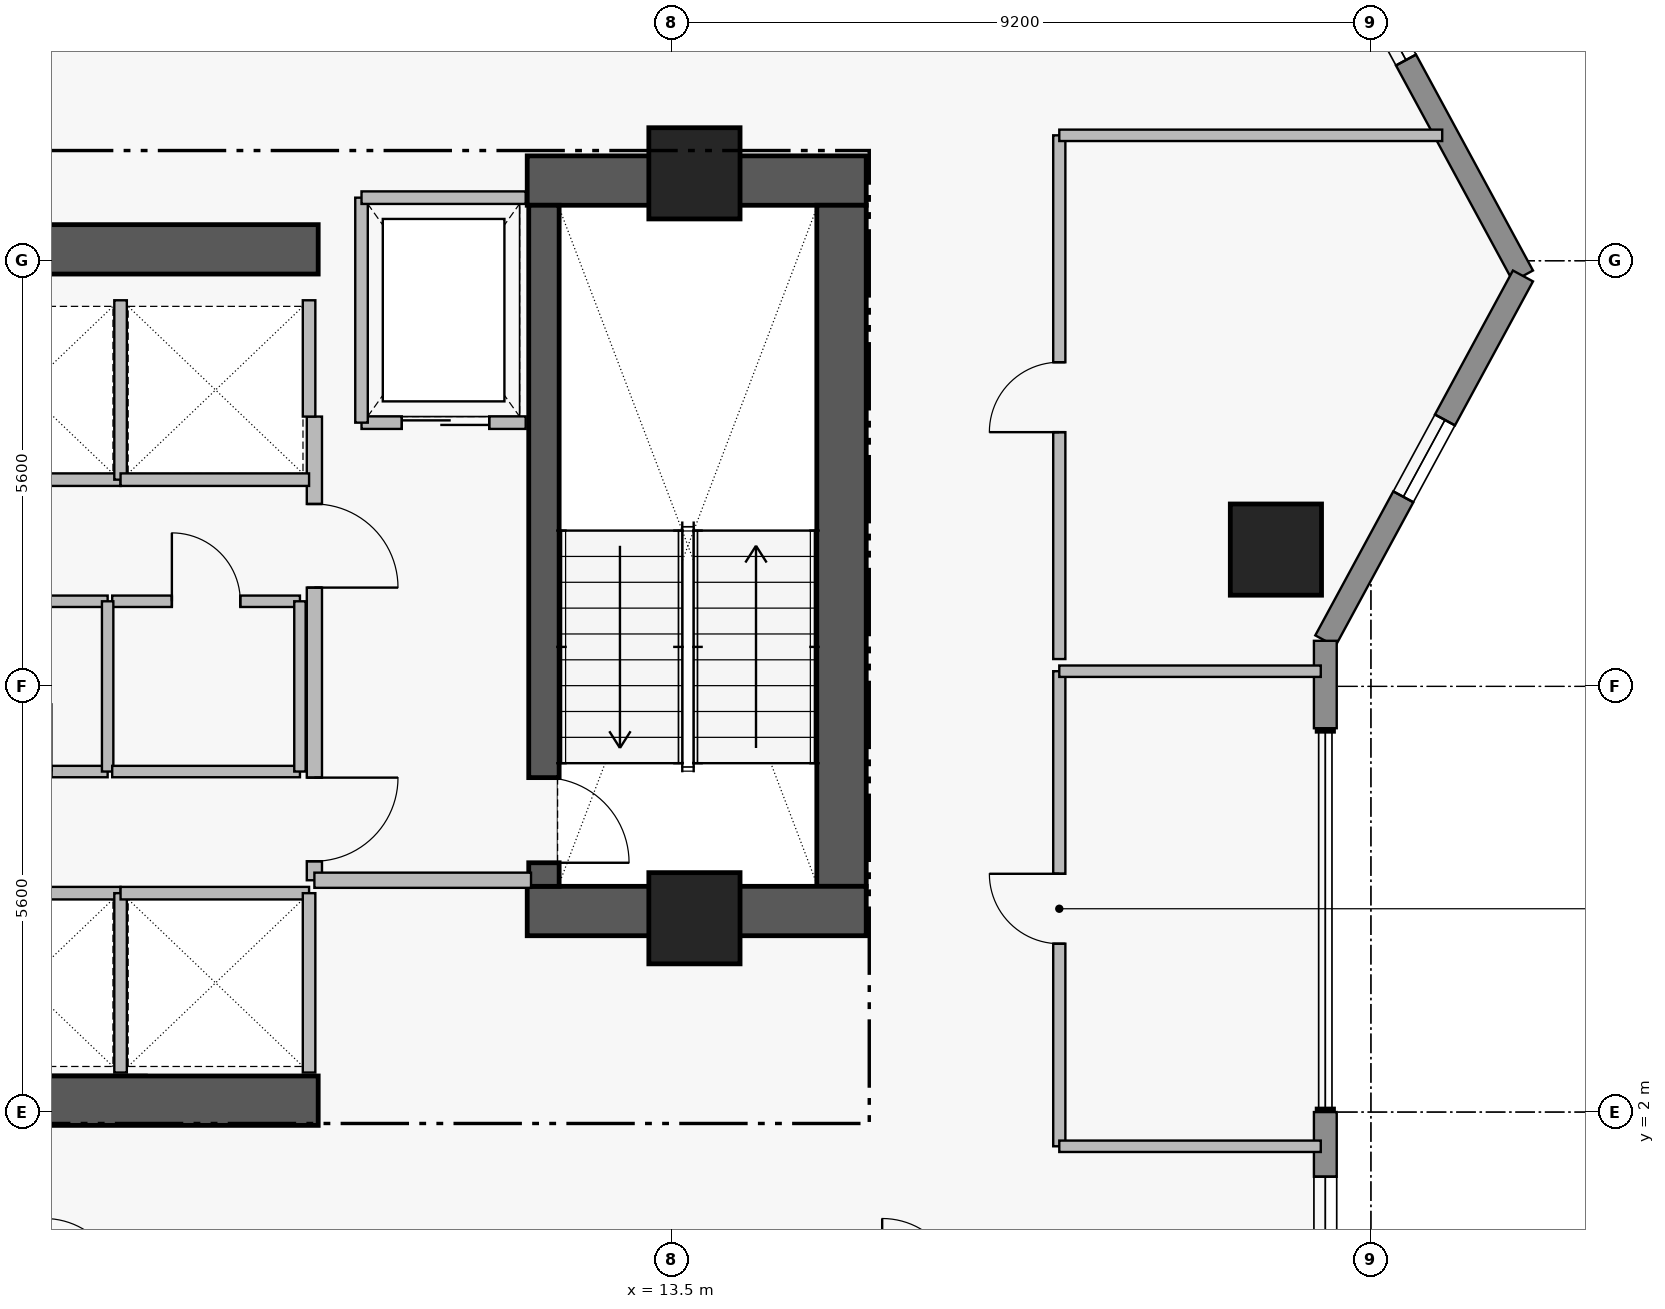
"""IFC4 building model, lengths in metres.
Left out: names, types, materials, properties, quantities, classifications, styles, units other than length and angle.
Written with IfcOpenShell. Run it as: python <this file> out.ifc"""

import sys

from ifc_helpers import new_model, si_unit, direction, frame, frame_2d, origin, origin_2d, place, context, subcontext, project, spatial, rectangle, extrude, element, fill, save


model = new_model("IFC4")
c1 = context("Model", 3, precision=1e-05, world=origin(), true_north=direction((0.0, 1.0)))
c2 = subcontext(c1, "Body", "Model", "MODEL_VIEW")
j1 = project(units=[si_unit("LENGTHUNIT", "METRE"), si_unit("PLANEANGLEUNIT", "RADIAN")], contexts=[c1])
p1 = place(None, origin())
s1 = spatial("IfcSite", under=j1, at=p1, CompositionType="ELEMENT")
p2 = place(p1, origin())
s2 = spatial("IfcBuilding", under=s1, at=p2, CompositionType="ELEMENT")
p3 = place(p2, frame((0.0, 0.0, 222.4)))
s3 = spatial("IfcBuildingStorey", under=s2, at=p3, CompositionType="ELEMENT", Elevation=222.4)
p4 = place(p3, frame((11.6, 14.255, 0.0), z_axis=(0.0, 0.0, 1.0), x_axis=(1.0, 0.0, 0.0)))
e1 = element("IfcWall", 1, at=p4, inside=s3, PredefinedType="SHEAR", context=c2, shape_type="SweptSolid", body=[
    extrude(rectangle(XDim=4.46, YDim=0.65, at=frame_2d((2.23, 0.0))), origin(), (0.0, 0.0, 1.0), 3.56),
])
p5 = place(p3, frame((15.735, 4.97, 0.0), z_axis=(0.0, 0.0, 1.0), x_axis=(0.0, 1.0, 0.0)))
e2 = element("IfcWall", 2, at=p5, inside=s3, PredefinedType="SHEAR", context=c2, shape_type="SweptSolid", body=[
    extrude(rectangle(XDim=8.96, YDim=0.65, at=frame_2d((4.48, 0.0))), origin(), (0.0, 0.0, 1.0), 3.56),
])
p6 = place(p3, frame((11.6, 4.645, 0.0), z_axis=(0.0, 0.0, 1.0), x_axis=(1.0, 0.0, 0.0)))
e3 = element("IfcWall", 3, at=p6, inside=s3, PredefinedType="SHEAR", context=c2, shape_type="SweptSolid", body=[
    extrude(rectangle(XDim=4.46, YDim=0.65, at=frame_2d((2.23, 0.0))), origin(), (0.0, 0.0, 1.0), 3.56),
])
for number, where, z_axis, x_axis in (
    (4, (1.25, 2.15, 0.0), (0.0, 0.0, 1.0), (1.0, 0.0, 0.0)),
    (5, (1.25, 13.35, 0.0), (0.0, 0.0, 1.0), (1.0, 0.0, 0.0)),
):
    element("IfcWall", number, at=place(p3, frame(where, z_axis=z_axis, x_axis=x_axis)), inside=s3, PredefinedType="SHEAR", context=c2, shape_type="SweptSolid", body=[
        extrude(rectangle(XDim=7.6, YDim=0.65, at=frame_2d((3.8, 0.0))), origin(), (0.0, 0.0, 1.0), 3.53),
    ])
p7 = place(p3, frame((11.82, 13.93, 0.0), z_axis=(0.0, 0.0, 1.0), x_axis=(0.0, -1.0, 0.0)))
e6 = element("IfcWall", 6, at=p7, inside=s3, PredefinedType="SHEAR", context=c2, shape_type="SweptSolid", body=[
    extrude(rectangle(XDim=8.96, YDim=0.4, at=frame_2d((4.48, 0.0))), origin(), (0.0, 0.0, 1.0), 3.56),
])
p8 = place(p7, frame((7.53, 0.0, 0.0)))
e7 = element("IfcOpeningElement", 7, at=p8, cuts=e6, PredefinedType="OPENING", context=c2, shape_type="SweptSolid", body=[
    extrude(rectangle(XDim=1.12, YDim=2.22, at=frame_2d((0.56, 1.11))), frame((0.0, 0.21, 0.0), z_axis=(0.0, -1.0, 0.0), x_axis=(1.0, 0.0, 0.0)), (0.0, 0.0, 1.0), 0.42),
])
for number, where, z_axis, x_axis in (
    (8, (13.8, 14.35, 0.0), (0.0, 0.0, 1.0), (1.0, 0.0, 0.0)),
    (9, (13.8, 4.55, 0.0), (0.0, 0.0, 1.0), (1.0, 0.0, 0.0)),
    (10, (21.45, 9.4, 0.0), (0.0, 0.0, 1.0), (1.0, 0.0, 0.0)),
):
    element("IfcColumn", number, at=place(p3, frame(where, z_axis=z_axis, x_axis=x_axis)), inside=s3, PredefinedType="COLUMN", context=c2, shape_type="SweptSolid", body=[
        extrude(rectangle(XDim=1.2, YDim=1.2, at=origin_2d()), origin(), (0.0, 0.0, 1.0), 3.75),
    ])
p9 = place(p3, frame((22.1, 17.8, 0.0), z_axis=(0.0, 0.0, 1.0), x_axis=(0.476258655584, -0.879305233114, 0.0)))
e11 = element("IfcWall", 11, at=p9, inside=s3, PredefinedType="STANDARD", context=c2, shape_type="SweptSolid", body=[
    extrude(rectangle(XDim=5.459, YDim=0.3, at=frame_2d((2.729, 0.0))), origin(), (0.0, 0.0, 1.0), 3.53),
])
p10 = place(p9, frame((1.078, 0.0, 1.25)))
e12 = element("IfcOpeningElement", 12, at=p10, cuts=e11, PredefinedType="OPENING", context=c2, shape_type="SweptSolid", body=[
    extrude(rectangle(XDim=1.15, YDim=1.55, at=frame_2d((0.575, 0.775))), frame((0.0, 0.16, 0.0), z_axis=(0.0, -1.0, 0.0), x_axis=(1.0, 0.0, 0.0)), (0.0, 0.0, 1.0), 0.32),
])
p11 = place(p3, frame((24.7, 13.0, 0.0), z_axis=(0.0, 0.0, 1.0), x_axis=(-0.476258655584, -0.879305233114, 0.0)))
e13 = element("IfcWall", 13, at=p11, inside=s3, PredefinedType="STANDARD", context=c2, shape_type="SweptSolid", body=[
    extrude(rectangle(XDim=5.459, YDim=0.3, at=frame_2d((2.729, 0.0))), origin(), (0.0, 0.0, 1.0), 3.53),
])
p12 = place(p11, frame((2.155, 0.0, 1.25)))
e14 = element("IfcOpeningElement", 14, at=p12, cuts=e13, PredefinedType="OPENING", context=c2, shape_type="SweptSolid", body=[
    extrude(rectangle(XDim=1.15, YDim=1.55, at=frame_2d((0.575, 0.775))), frame((0.0, 0.16, 0.0), z_axis=(0.0, -1.0, 0.0), x_axis=(1.0, 0.0, 0.0)), (0.0, 0.0, 1.0), 0.32),
])
p13 = place(p3, frame((22.1, 8.2, 0.0), z_axis=(0.0, 0.0, 1.0), x_axis=(0.0, -1.0, 0.0)))
e15 = element("IfcWall", 15, at=p13, inside=s3, PredefinedType="STANDARD", context=c2, shape_type="SweptSolid", body=[
    extrude(rectangle(XDim=1.15, YDim=0.3, at=frame_2d((0.575, 0.0))), origin(), (0.0, 0.0, 1.0), 3.53),
])
p14 = place(p3, frame((22.1, 2.0, 0.0), z_axis=(0.0, 0.0, 1.0), x_axis=(0.0, -1.0, 0.0)))
e16 = element("IfcWall", 16, at=p14, inside=s3, PredefinedType="STANDARD", context=c2, shape_type="SweptSolid", body=[
    extrude(rectangle(XDim=2.85, YDim=0.3, at=frame_2d((1.425, 0.0))), origin(), (0.0, 0.0, 1.0), 3.53),
])
p15 = place(p14, frame((0.85, 0.0, 0.95)))
e17 = element("IfcOpeningElement", 17, at=p15, cuts=e16, PredefinedType="OPENING", context=c2, shape_type="SweptSolid", body=[
    extrude(rectangle(XDim=1.15, YDim=1.55, at=frame_2d((0.575, 0.775))), frame((0.0, 0.16, 0.0), z_axis=(0.0, -1.0, 0.0), x_axis=(1.0, 0.0, 0.0)), (0.0, 0.0, 1.0), 0.32),
])
p16 = place(p3, frame((8.8, 11.15, 0.0), z_axis=(0.0, 0.0, 1.0), x_axis=(0.0, -1.0, 0.0)))
e18 = element("IfcWall", 18, at=p16, inside=s3, PredefinedType="PARTITIONING", context=c2, shape_type="SweptSolid", body=[
    extrude(rectangle(XDim=6.1, YDim=0.2, at=frame_2d((3.05, 0.0))), origin(), (0.0, 0.0, 1.0), 3.53),
])
p17 = place(p16, frame((1.15, 0.0, 0.0)))
e19 = element("IfcOpeningElement", 19, at=p17, cuts=e18, PredefinedType="OPENING", context=c2, shape_type="SweptSolid", body=[
    extrude(rectangle(XDim=1.1, YDim=2.2, at=frame_2d((0.55, 1.1))), frame((0.0, 0.11, 0.0), z_axis=(0.0, -1.0, 0.0), x_axis=(1.0, 0.0, 0.0)), (0.0, 0.0, 1.0), 0.22),
])
p18 = place(p16, frame((4.75, 0.0, 0.0)))
e20 = element("IfcOpeningElement", 20, at=p18, cuts=e18, PredefinedType="OPENING", context=c2, shape_type="SweptSolid", body=[
    extrude(rectangle(XDim=1.1, YDim=2.2, at=frame_2d((0.55, 1.1))), frame((0.0, 0.11, 0.0), z_axis=(0.0, -1.0, 0.0), x_axis=(1.0, 0.0, 0.0)), (0.0, 0.0, 1.0), 0.22),
])
p19 = place(p3, frame((9.42, 11.07, 0.0), z_axis=(0.0, 0.0, 1.0), x_axis=(1.0, 0.0, 0.0)))
e21 = element("IfcWall", 21, at=p19, inside=s3, PredefinedType="PARTITIONING", context=c2, shape_type="SweptSolid", body=[
    extrude(rectangle(XDim=2.16, YDim=0.165, at=frame_2d((1.08, 0.0))), origin(), (0.0, 0.0, 1.0), 3.53),
])
p20 = place(p19, frame((0.53, 0.0, 0.0)))
e22 = element("IfcOpeningElement", 22, at=p20, cuts=e21, PredefinedType="OPENING", context=c2, shape_type="SweptSolid", body=[
    extrude(rectangle(XDim=1.15, YDim=2.25, at=frame_2d((0.575, 1.125))), frame((0.0, 0.093, 0.0), z_axis=(0.0, -1.0, 0.0), x_axis=(1.0, 0.0, 0.0)), (0.0, 0.0, 1.0), 0.185),
])
p21 = place(p3, frame((3.7, 6.48, 0.0), z_axis=(0.0, 0.0, 1.0), x_axis=(1.0, 0.0, 0.0)))
e23 = element("IfcWall", 23, at=p21, inside=s3, PredefinedType="PARTITIONING", context=c2, shape_type="SweptSolid", body=[
    extrude(rectangle(XDim=2.38, YDim=0.15, at=frame_2d((1.19, 0.0))), origin(), (0.0, 0.0, 1.0), 3.53),
])
p22 = place(p21, frame((0.74, 0.0, 0.0)))
e24 = element("IfcOpeningElement", 24, at=p22, cuts=e23, PredefinedType="OPENING", context=c2, shape_type="SweptSolid", body=[
    extrude(rectangle(XDim=0.9, YDim=2.15, at=frame_2d((0.45, 1.075))), frame((0.0, 0.085, 0.0), z_axis=(0.0, -1.0, 0.0), x_axis=(1.0, 0.0, 0.0)), (0.0, 0.0, 1.0), 0.17),
])
p23 = place(p3, frame((6.14, 8.72, 0.0), z_axis=(0.0, 0.0, 1.0), x_axis=(1.0, 0.0, 0.0)))
e25 = element("IfcWall", 25, at=p23, inside=s3, PredefinedType="PARTITIONING", context=c2, shape_type="SweptSolid", body=[
    extrude(rectangle(XDim=2.47, YDim=0.15, at=frame_2d((1.235, 0.0))), origin(), (0.0, 0.0, 1.0), 3.53),
])
p24 = place(p23, frame((0.785, 0.0, 0.0)))
e26 = element("IfcOpeningElement", 26, at=p24, cuts=e25, PredefinedType="OPENING", context=c2, shape_type="SweptSolid", body=[
    extrude(rectangle(XDim=0.9, YDim=2.15, at=frame_2d((0.45, 1.075))), frame((0.0, 0.085, 0.0), z_axis=(0.0, -1.0, 0.0), x_axis=(1.0, 0.0, 0.0)), (0.0, 0.0, 1.0), 0.17),
])
p25 = place(p3, frame((18.6, 1.55, 0.0), z_axis=(0.0, 0.0, 1.0), x_axis=(0.0, 1.0, 0.0)))
e27 = element("IfcWall", 27, at=p25, inside=s3, PredefinedType="PARTITIONING", context=c2, shape_type="SweptSolid", body=[
    extrude(rectangle(XDim=6.25, YDim=0.16, at=frame_2d((3.125, 0.0))), origin(), (0.0, 0.0, 1.0), 3.53),
])
p26 = place(p25, frame((2.665, 0.0, 0.0)))
e28 = element("IfcOpeningElement", 28, at=p26, cuts=e27, PredefinedType="OPENING", context=c2, shape_type="SweptSolid", body=[
    extrude(rectangle(XDim=0.92, YDim=2.12, at=frame_2d((0.46, 1.06))), frame((0.0, 0.09, 0.0), z_axis=(0.0, -1.0, 0.0), x_axis=(1.0, 0.0, 0.0)), (0.0, 0.0, 1.0), 0.18),
])
p27 = place(p3, frame((18.6, 7.96, 0.0), z_axis=(0.0, 0.0, 1.0), x_axis=(0.0, 1.0, 0.0)))
e29 = element("IfcWall", 29, at=p27, inside=s3, PredefinedType="PARTITIONING", context=c2, shape_type="SweptSolid", body=[
    extrude(rectangle(XDim=6.89, YDim=0.16, at=frame_2d((3.445, 0.0))), origin(), (0.0, 0.0, 1.0), 3.53),
])
p28 = place(p27, frame((2.985, 0.0, 0.0)))
e30 = element("IfcOpeningElement", 30, at=p28, cuts=e29, PredefinedType="OPENING", context=c2, shape_type="SweptSolid", body=[
    extrude(rectangle(XDim=0.92, YDim=2.12, at=frame_2d((0.46, 1.06))), frame((0.0, 0.09, 0.0), z_axis=(0.0, -1.0, 0.0), x_axis=(1.0, 0.0, 0.0)), (0.0, 0.0, 1.0), 0.18),
])
p29 = place(p3, frame((8.8, 5.05, 0.0), z_axis=(0.0, 0.0, 1.0), x_axis=(1.0, 0.0, 0.0)))
e31 = element("IfcWall", 31, at=p29, inside=s3, PredefinedType="PARTITIONING", context=c2, shape_type="SweptSolid", body=[
    extrude(rectangle(XDim=2.85, YDim=0.2, at=frame_2d((1.425, 0.0))), origin(), (0.0, 0.0, 1.0), 3.53),
])
p30 = place(p3, frame((9.42, 11.07, 0.0), z_axis=(0.0, 0.0, 1.0), x_axis=(0.0, 1.0, 0.0)))
e32 = element("IfcWall", 32, at=p30, inside=s3, PredefinedType="PARTITIONING", context=c2, shape_type="SweptSolid", body=[
    extrude(rectangle(XDim=2.96, YDim=0.165, at=frame_2d((1.48, 0.0))), origin(), (0.0, 0.0, 1.0), 3.53),
])
p31 = place(p3, frame((9.42, 14.03, 0.0), z_axis=(0.0, 0.0, 1.0), x_axis=(1.0, 0.0, 0.0)))
e33 = element("IfcWall", 33, at=p31, inside=s3, PredefinedType="PARTITIONING", context=c2, shape_type="SweptSolid", body=[
    extrude(rectangle(XDim=2.16, YDim=0.165, at=frame_2d((1.08, 0.0))), origin(), (0.0, 0.0, 1.0), 3.53),
])
p32 = place(p3, frame((3.75, 4.88, 0.0), z_axis=(0.0, 0.0, 1.0), x_axis=(1.0, 0.0, 0.0)))
e34 = element("IfcWall", 34, at=p32, inside=s3, PredefinedType="PARTITIONING", context=c2, shape_type="SweptSolid", body=[
    extrude(rectangle(XDim=2.5, YDim=0.165, at=frame_2d((1.25, 0.0))), origin(), (0.0, 0.0, 1.0), 3.53),
])
p33 = place(p3, frame((6.25, 2.52, 0.0), z_axis=(0.0, 0.0, 1.0), x_axis=(0.0, 1.0, 0.0)))
e35 = element("IfcWall", 35, at=p33, inside=s3, PredefinedType="PARTITIONING", context=c2, shape_type="SweptSolid", body=[
    extrude(rectangle(XDim=2.36, YDim=0.165, at=frame_2d((1.18, 0.0))), origin(), (0.0, 0.0, 1.0), 3.53),
])
p34 = place(p3, frame((6.25, 4.88, 0.0), z_axis=(0.0, 0.0, 1.0), x_axis=(1.0, 0.0, 0.0)))
e36 = element("IfcWall", 36, at=p34, inside=s3, PredefinedType="PARTITIONING", context=c2, shape_type="SweptSolid", body=[
    extrude(rectangle(XDim=2.48, YDim=0.165, at=frame_2d((1.24, 0.0))), origin(), (0.0, 0.0, 1.0), 3.53),
])
p35 = place(p3, frame((8.73, 2.52, 0.0), z_axis=(0.0, 0.0, 1.0), x_axis=(0.0, 1.0, 0.0)))
e37 = element("IfcWall", 37, at=p35, inside=s3, PredefinedType="PARTITIONING", context=c2, shape_type="SweptSolid", body=[
    extrude(rectangle(XDim=2.36, YDim=0.165, at=frame_2d((1.18, 0.0))), origin(), (0.0, 0.0, 1.0), 3.53),
])
p36 = place(p3, frame((3.75, 10.32, 0.0), z_axis=(0.0, 0.0, 1.0), x_axis=(1.0, 0.0, 0.0)))
e38 = element("IfcWall", 38, at=p36, inside=s3, PredefinedType="PARTITIONING", context=c2, shape_type="SweptSolid", body=[
    extrude(rectangle(XDim=2.5, YDim=0.165, at=frame_2d((1.25, 0.0))), origin(), (0.0, 0.0, 1.0), 3.53),
])
p37 = place(p3, frame((6.25, 10.32, 0.0), z_axis=(0.0, 0.0, 1.0), x_axis=(0.0, 1.0, 0.0)))
e39 = element("IfcWall", 39, at=p37, inside=s3, PredefinedType="PARTITIONING", context=c2, shape_type="SweptSolid", body=[
    extrude(rectangle(XDim=2.36, YDim=0.165, at=frame_2d((1.18, 0.0))), origin(), (0.0, 0.0, 1.0), 3.53),
])
p38 = place(p3, frame((6.25, 10.32, 0.0), z_axis=(0.0, 0.0, 1.0), x_axis=(1.0, 0.0, 0.0)))
e40 = element("IfcWall", 40, at=p38, inside=s3, PredefinedType="PARTITIONING", context=c2, shape_type="SweptSolid", body=[
    extrude(rectangle(XDim=2.48, YDim=0.165, at=frame_2d((1.24, 0.0))), origin(), (0.0, 0.0, 1.0), 3.53),
])
p39 = place(p3, frame((8.73, 11.15, 0.0), z_axis=(0.0, 0.0, 1.0), x_axis=(0.0, 1.0, 0.0)))
e41 = element("IfcWall", 41, at=p39, inside=s3, PredefinedType="PARTITIONING", context=c2, shape_type="SweptSolid", body=[
    extrude(rectangle(XDim=1.53, YDim=0.165, at=frame_2d((0.765, 0.0))), origin(), (0.0, 0.0, 1.0), 3.53),
])
p40 = place(p3, frame((3.7, 8.72, 0.0), z_axis=(0.0, 0.0, 1.0), x_axis=(1.0, 0.0, 0.0)))
e42 = element("IfcWall", 42, at=p40, inside=s3, PredefinedType="PARTITIONING", context=c2, shape_type="SweptSolid", body=[
    extrude(rectangle(XDim=2.38, YDim=0.15, at=frame_2d((1.19, 0.0))), origin(), (0.0, 0.0, 1.0), 3.53),
])
p41 = place(p3, frame((6.08, 6.48, 0.0), z_axis=(0.0, 0.0, 1.0), x_axis=(0.0, 1.0, 0.0)))
e43 = element("IfcWall", 43, at=p41, inside=s3, PredefinedType="PARTITIONING", context=c2, shape_type="SweptSolid", body=[
    extrude(rectangle(XDim=2.24, YDim=0.15, at=frame_2d((1.12, 0.0))), origin(), (0.0, 0.0, 1.0), 3.53),
])
p42 = place(p3, frame((6.14, 6.48, 0.0), z_axis=(0.0, 0.0, 1.0), x_axis=(1.0, 0.0, 0.0)))
e44 = element("IfcWall", 44, at=p42, inside=s3, PredefinedType="PARTITIONING", context=c2, shape_type="SweptSolid", body=[
    extrude(rectangle(XDim=2.47, YDim=0.15, at=frame_2d((1.235, 0.0))), origin(), (0.0, 0.0, 1.0), 3.53),
])
p43 = place(p3, frame((8.61, 6.48, 0.0), z_axis=(0.0, 0.0, 1.0), x_axis=(0.0, 1.0, 0.0)))
e45 = element("IfcWall", 45, at=p43, inside=s3, PredefinedType="PARTITIONING", context=c2, shape_type="SweptSolid", body=[
    extrude(rectangle(XDim=2.24, YDim=0.15, at=frame_2d((1.12, 0.0))), origin(), (0.0, 0.0, 1.0), 3.53),
])
for number, where, z_axis, x_axis in (
    (46, (18.6, 1.55, 0.0), (0.0, 0.0, 1.0), (1.0, 0.0, 0.0)),
    (47, (18.6, 7.8, 0.0), (0.0, 0.0, 1.0), (1.0, 0.0, 0.0)),
):
    element("IfcWall", number, at=place(p3, frame(where, z_axis=z_axis, x_axis=x_axis)), inside=s3, PredefinedType="PARTITIONING", context=c2, shape_type="SweptSolid", body=[
        extrude(rectangle(XDim=3.44, YDim=0.15, at=frame_2d((1.72, 0.0))), origin(), (0.0, 0.0, 1.0), 3.53),
    ])
p44 = place(p3, frame((18.6, 14.85, 0.0), z_axis=(0.0, 0.0, 1.0), x_axis=(1.0, 0.0, 0.0)))
e48 = element("IfcWall", 48, at=p44, inside=s3, PredefinedType="PARTITIONING", context=c2, shape_type="SweptSolid", body=[
    extrude(rectangle(XDim=5.038, YDim=0.15, at=frame_2d((2.519, 0.0))), origin(), (0.0, 0.0, 1.0), 3.53),
])
p45 = place(p10, origin())
e49 = element("IfcWindow", 49, at=p45, inside=s3, PartitioningType="SINGLE_PANEL", PredefinedType="WINDOW", context=c2, shape_type="SweptSolid", body=[
    extrude(rectangle(XDim=1.15, YDim=1.55, at=frame_2d((0.575, 0.775))), frame((0.0, 0.03, 0.0), z_axis=(0.0, -1.0, 0.0), x_axis=(1.0, 0.0, 0.0)), (0.0, 0.0, 1.0), 0.06),
])
fill(e12, e49)
p46 = place(p12, origin())
e50 = element("IfcWindow", 50, at=p46, inside=s3, PartitioningType="SINGLE_PANEL", PredefinedType="WINDOW", context=c2, shape_type="SweptSolid", body=[
    extrude(rectangle(XDim=1.15, YDim=1.55, at=frame_2d((0.575, 0.775))), frame((0.0, 0.03, 0.0), z_axis=(0.0, -1.0, 0.0), x_axis=(1.0, 0.0, 0.0)), (0.0, 0.0, 1.0), 0.06),
])
fill(e14, e50)
p47 = place(p15, origin())
e51 = element("IfcWindow", 51, at=p47, inside=s3, PartitioningType="SINGLE_PANEL", PredefinedType="WINDOW", context=c2, shape_type="SweptSolid", body=[
    extrude(rectangle(XDim=1.15, YDim=1.55, at=frame_2d((0.575, 0.775))), frame((0.0, 0.03, 0.0), z_axis=(0.0, -1.0, 0.0), x_axis=(1.0, 0.0, 0.0)), (0.0, 0.0, 1.0), 0.06),
])
fill(e17, e51)
p48 = place(p8, origin())
e52 = element("IfcDoor", 52, at=p48, inside=s3, OperationType="SINGLE_SWING_RIGHT", PredefinedType="DOOR", context=c2, shape_type="SweptSolid", body=[
    extrude(rectangle(XDim=1.12, YDim=2.22, at=frame_2d((0.56, 1.11))), frame((0.0, 0.025, 0.0), z_axis=(0.0, -1.0, 0.0), x_axis=(1.0, 0.0, 0.0)), (0.0, 0.0, 1.0), 0.05),
])
fill(e7, e52)
p49 = place(p17, origin())
e53 = element("IfcDoor", 53, at=p49, inside=s3, OperationType="SINGLE_SWING_RIGHT", PredefinedType="DOOR", context=c2, shape_type="SweptSolid", body=[
    extrude(rectangle(XDim=1.1, YDim=2.2, at=frame_2d((0.55, 1.1))), frame((0.0, 0.025, 0.0), z_axis=(0.0, -1.0, 0.0), x_axis=(1.0, 0.0, 0.0)), (0.0, 0.0, 1.0), 0.05),
])
fill(e19, e53)
p50 = place(p18, origin())
e54 = element("IfcDoor", 54, at=p50, inside=s3, OperationType="SINGLE_SWING_LEFT", PredefinedType="DOOR", context=c2, shape_type="SweptSolid", body=[
    extrude(rectangle(XDim=1.1, YDim=2.2, at=frame_2d((0.55, 1.1))), frame((0.0, 0.025, 0.0), z_axis=(0.0, -1.0, 0.0), x_axis=(1.0, 0.0, 0.0)), (0.0, 0.0, 1.0), 0.05),
])
fill(e20, e54)
p51 = place(p20, origin())
e55 = element("IfcDoor", 55, at=p51, inside=s3, OperationType="SLIDING_TO_LEFT", PredefinedType="DOOR", context=c2, shape_type="SweptSolid", body=[
    extrude(rectangle(XDim=1.15, YDim=2.25, at=frame_2d((0.575, 1.125))), frame((0.0, 0.025, 0.0), z_axis=(0.0, -1.0, 0.0), x_axis=(1.0, 0.0, 0.0)), (0.0, 0.0, 1.0), 0.05),
])
fill(e22, e55)
p52 = place(p24, origin())
e56 = element("IfcDoor", 56, at=p52, inside=s3, OperationType="SINGLE_SWING_LEFT", PredefinedType="DOOR", context=c2, shape_type="SweptSolid", body=[
    extrude(rectangle(XDim=0.9, YDim=2.15, at=frame_2d((0.45, 1.075))), frame((0.0, 0.025, 0.0), z_axis=(0.0, -1.0, 0.0), x_axis=(1.0, 0.0, 0.0)), (0.0, 0.0, 1.0), 0.05),
])
fill(e26, e56)
p53 = place(p26, origin())
e57 = element("IfcDoor", 57, at=p53, inside=s3, OperationType="SINGLE_SWING_RIGHT", PredefinedType="DOOR", context=c2, shape_type="SweptSolid", body=[
    extrude(rectangle(XDim=0.92, YDim=2.12, at=frame_2d((0.46, 1.06))), frame((0.0, 0.025, 0.0), z_axis=(0.0, -1.0, 0.0), x_axis=(1.0, 0.0, 0.0)), (0.0, 0.0, 1.0), 0.05),
])
fill(e28, e57)
p54 = place(p28, origin())
e58 = element("IfcDoor", 58, at=p54, inside=s3, OperationType="SINGLE_SWING_LEFT", PredefinedType="DOOR", context=c2, shape_type="SweptSolid", body=[
    extrude(rectangle(XDim=0.92, YDim=2.12, at=frame_2d((0.46, 1.06))), frame((0.0, 0.025, 0.0), z_axis=(0.0, -1.0, 0.0), x_axis=(1.0, 0.0, 0.0)), (0.0, 0.0, 1.0), 0.05),
])
fill(e30, e58)
save(model, sys.argv[1])
